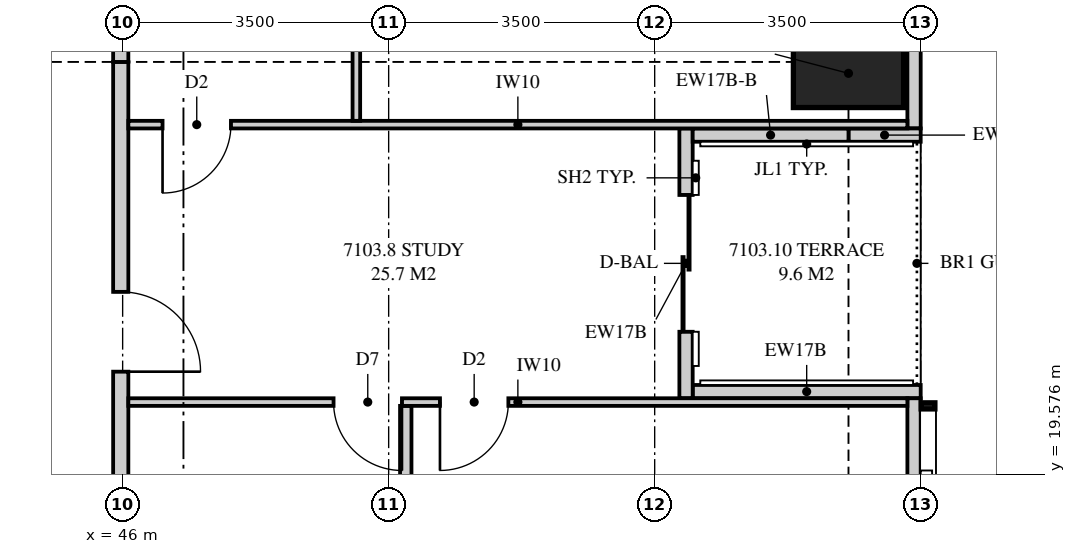
"""IFC4 building model, lengths in metres.
Left out: names, types, materials, properties, quantities, classifications, styles, units other than length and angle.
Written with IfcOpenShell. Run it as: python <this file> out.ifc"""

import sys

from ifc_helpers import new_model, si_unit, direction, frame, frame_2d, origin, origin_2d, place, context, subcontext, project, spatial, polyline, rectangle, outline, extrude, element, fill, save


model = new_model("IFC4")
c1 = context("Model", 3, precision=1e-05, world=origin(), true_north=direction((0.0, 1.0)))
c2 = subcontext(c1, "Body", "Model", "MODEL_VIEW")
j1 = project(units=[si_unit("LENGTHUNIT", "METRE"), si_unit("PLANEANGLEUNIT", "RADIAN")], contexts=[c1])
p1 = place(None, origin())
s1 = spatial("IfcSite", under=j1, at=p1, CompositionType="ELEMENT")
p2 = place(p1, origin())
s2 = spatial("IfcBuilding", under=s1, at=p2, CompositionType="ELEMENT")
p3 = place(p2, frame((0.0, 0.0, 259.95)))
s3 = spatial("IfcBuildingStorey", under=s2, at=p3, CompositionType="ELEMENT", Elevation=259.95)
p4 = place(p3, frame((55.55, 25.0, 0.0), z_axis=(0.0, 0.0, 1.0), x_axis=(1.0, 0.0, 0.0)))
e1 = element("IfcColumn", 1, at=p4, inside=s3, PredefinedType="COLUMN", context=c2, shape_type="SweptSolid", body=[
    extrude(rectangle(XDim=1.45, YDim=1.2, at=origin_2d()), origin(), (0.0, 0.0, 1.0), 3.9),
])
p5 = place(p3, frame((56.413, 3.051, 0.0), z_axis=(0.0, 0.0, 1.0), x_axis=(0.0, 1.0, 0.0)))
e2 = element("IfcWall", 2, at=p5, inside=s3, PredefinedType="SOLIDWALL", context=c2, shape_type="SweptSolid", body=[
    extrude(outline(polyline([(0.0, 0.0), (17.524, 0.0), (17.524, 2.7), (9.949, 2.7), (9.949, 3.66), (9.858, 3.66), (9.858, 2.7), (9.688, 2.7), (9.688, 3.66), (0.0, 3.66), (0.0, 0.0)])), frame((0.0, 0.087, 0.0), z_axis=(0.0, -1.0, 0.0), x_axis=(1.0, 0.0, 0.0)), (0.0, 0.0, 1.0), 0.175),
])
p6 = place(p5, frame((5.924, 0.0, 0.4)))
e3 = element("IfcOpeningElement", 3, at=p6, cuts=e2, PredefinedType="OPENING", context=c2, shape_type="SweptSolid", body=[
    extrude(rectangle(XDim=2.1, YDim=2.25, at=frame_2d((1.05, 1.125))), frame((0.0, 0.097, 0.0), z_axis=(0.0, -1.0, 0.0), x_axis=(1.0, 0.0, 0.0)), (0.0, 0.0, 1.0), 0.195),
])
p7 = place(p5, frame((10.804, 0.0, 0.4)))
e4 = element("IfcOpeningElement", 4, at=p7, cuts=e2, PredefinedType="OPENING", context=c2, shape_type="SweptSolid", body=[
    extrude(rectangle(XDim=2.1, YDim=2.25, at=frame_2d((1.05, 1.125))), frame((0.0, 0.097, 0.0), z_axis=(0.0, -1.0, 0.0), x_axis=(1.0, 0.0, 0.0)), (0.0, 0.0, 1.0), 0.195),
])
p8 = place(p5, frame((14.374, 0.0, 0.4)))
e5 = element("IfcOpeningElement", 5, at=p8, cuts=e2, PredefinedType="OPENING", context=c2, shape_type="SweptSolid", body=[
    extrude(rectangle(XDim=2.1, YDim=2.25, at=frame_2d((1.05, 1.125))), frame((0.0, 0.097, 0.0), z_axis=(0.0, -1.0, 0.0), x_axis=(1.0, 0.0, 0.0)), (0.0, 0.0, 1.0), 0.195),
])
p9 = place(p3, frame((56.413, 24.125, 0.0), z_axis=(0.0, 0.0, 1.0), x_axis=(0.0, 1.0, 0.0)))
e6 = element("IfcWall", 6, at=p9, inside=s3, PredefinedType="SOLIDWALL", context=c2, shape_type="SweptSolid", body=[
    extrude(outline(polyline([(0.0, 0.0), (6.824, 0.0), (6.824, 3.66), (1.083, 3.66), (1.083, 2.7), (1.018, 2.7), (1.018, 3.66), (0.875, 3.66), (0.875, 2.7), (0.0, 2.7), (0.0, 0.0)])), frame((0.0, 0.087, 0.0), z_axis=(0.0, -1.0, 0.0), x_axis=(1.0, 0.0, 0.0)), (0.0, 0.0, 1.0), 0.175),
])
p10 = place(p9, frame((1.729, 0.0, 0.4)))
e7 = element("IfcOpeningElement", 7, at=p10, cuts=e6, PredefinedType="OPENING", context=c2, shape_type="SweptSolid", body=[
    extrude(rectangle(XDim=2.4, YDim=2.0, at=frame_2d((1.2, 1.0))), frame((0.0, 0.097, 0.0), z_axis=(0.0, -1.0, 0.0), x_axis=(1.0, 0.0, 0.0)), (0.0, 0.0, 1.0), 0.195),
])
p11 = place(p3, frame((53.413, 20.575, 0.0), z_axis=(0.0, 0.0, 1.0), x_axis=(0.0, 1.0, 0.0)))
e8 = element("IfcWall", 8, at=p11, inside=s3, PredefinedType="SOLIDWALL", context=c2, shape_type="SweptSolid", body=[
    extrude(outline(polyline([(0.0, 0.0), (3.55, 0.0), (3.55, 3.06), (3.225, 3.06), (3.225, 3.66), (0.0, 3.66), (0.0, 0.0)])), frame((0.0, 0.087, 0.0), z_axis=(0.0, -1.0, 0.0), x_axis=(1.0, 0.0, 0.0)), (0.0, 0.0, 1.0), 0.175),
])
p12 = place(p11, frame((0.875, 0.0, 0.0)))
e9 = element("IfcOpeningElement", 9, at=p12, cuts=e8, PredefinedType="OPENING", context=c2, shape_type="SweptSolid", body=[
    extrude(rectangle(XDim=1.8, YDim=2.4, at=frame_2d((0.9, 1.2))), frame((0.0, 0.097, 0.0), z_axis=(0.0, -1.0, 0.0), x_axis=(1.0, 0.0, 0.0)), (0.0, 0.0, 1.0), 0.195),
])
p13 = place(p3, frame((56.5, 20.663, 0.0), z_axis=(0.0, 0.0, 1.0), x_axis=(-1.0, 0.0, 0.0)))
e10 = element("IfcWall", 10, at=p13, inside=s3, PredefinedType="SOLIDWALL", context=c2, shape_type="SweptSolid", body=[
    extrude(outline(polyline([(0.0, 0.0), (3.0, 0.0), (3.0, 3.66), (1.75, 3.66), (1.75, 2.7), (0.15, 2.7), (0.15, 3.66), (0.0, 3.66), (0.0, 0.0)])), frame((0.0, 0.087, 0.0), z_axis=(0.0, -1.0, 0.0), x_axis=(1.0, 0.0, 0.0)), (0.0, 0.0, 1.0), 0.175),
])
p14 = place(p3, frame((56.5, 24.038, 0.0), z_axis=(0.0, 0.0, 1.0), x_axis=(-1.0, 0.0, 0.0)))
e11 = element("IfcWall", 11, at=p14, inside=s3, PredefinedType="SOLIDWALL", context=c2, shape_type="SweptSolid", body=[
    extrude(outline(polyline([(0.0, 0.0), (0.95, 0.0), (0.95, 2.7), (0.15, 2.7), (0.15, 3.66), (0.0, 3.66), (0.0, 0.0)])), frame((0.0, 0.087, 0.0), z_axis=(0.0, -1.0, 0.0), x_axis=(1.0, 0.0, 0.0)), (0.0, 0.0, 1.0), 0.175),
])
p15 = place(p3, frame((55.55, 24.038, 0.0), z_axis=(0.0, 0.0, 1.0), x_axis=(-1.0, 0.0, 0.0)))
e12 = element("IfcWall", 12, at=p15, inside=s3, PredefinedType="SOLIDWALL", context=c2, shape_type="SweptSolid", body=[
    extrude(outline(polyline([(0.0, 0.0), (2.05, 0.0), (2.05, 3.06), (0.8, 3.06), (0.8, 2.7), (0.0, 2.7), (0.0, 0.0)])), frame((0.0, 0.087, 0.0), z_axis=(0.0, -1.0, 0.0), x_axis=(1.0, 0.0, 0.0)), (0.0, 0.0, 1.0), 0.175),
])
p16 = place(p3, frame((45.975, 13.0, 0.0), z_axis=(0.0, 0.0, 1.0), x_axis=(0.0, 1.0, 0.0)))
e13 = element("IfcWall", 13, at=p16, inside=s3, PredefinedType="PARTITIONING", context=c2, shape_type="SweptSolid", body=[
    extrude(outline(polyline([(0.0, 0.0), (12.0, 0.0), (12.0, 3.06), (10.69, 3.06), (10.69, 3.66), (7.06, 3.66), (7.06, 3.06), (4.44, 3.06), (4.44, 3.66), (1.31, 3.66), (1.31, 3.06), (0.0, 3.06), (0.0, 0.0)])), frame((0.0, 0.1, 0.0), z_axis=(0.0, -1.0, 0.0), x_axis=(1.0, 0.0, 0.0)), (0.0, 0.0, 1.0), 0.2),
])
p17 = place(p16, frame((7.925, 0.0, 0.0)))
e14 = element("IfcOpeningElement", 14, at=p17, cuts=e13, PredefinedType="OPENING", context=c2, shape_type="SweptSolid", body=[
    extrude(rectangle(XDim=1.05, YDim=2.2, at=frame_2d((0.525, 1.1))), frame((0.0, 0.11, 0.0), z_axis=(0.0, -1.0, 0.0), x_axis=(1.0, 0.0, 0.0)), (0.0, 0.0, 1.0), 0.22),
])
p18 = place(p3, frame((45.975, 25.0, 0.0), z_axis=(0.0, 0.0, 1.0), x_axis=(0.0, 1.0, 0.0)))
e15 = element("IfcWall", 15, at=p18, inside=s3, PredefinedType="PARTITIONING", context=c2, shape_type="SweptSolid", body=[
    extrude(rectangle(XDim=3.975, YDim=0.2, at=frame_2d((1.988, 0.0))), origin(), (0.0, 0.0, 1.0), 3.06),
])
p19 = place(p3, frame((56.325, 20.525, 0.0), z_axis=(0.0, 0.0, 1.0), x_axis=(-1.0, 0.0, 0.0)))
e16 = element("IfcWall", 16, at=p19, inside=s3, PredefinedType="PARTITIONING", context=c2, shape_type="SweptSolid", body=[
    extrude(outline(polyline([(0.0, 0.0), (10.25, 0.0), (10.25, 3.66), (1.635, 3.66), (1.635, 2.7), (0.0, 2.7), (0.0, 3.66), (0.0, 0.0)])), frame((0.0, 0.05, 0.0), z_axis=(0.0, -1.0, 0.0), x_axis=(1.0, 0.0, 0.0)), (0.0, 0.0, 1.0), 0.1),
])
p20 = place(p19, frame((5.25, 0.0, 0.0)))
e17 = element("IfcOpeningElement", 17, at=p20, cuts=e16, PredefinedType="OPENING", context=c2, shape_type="SweptSolid", body=[
    extrude(rectangle(XDim=0.9, YDim=2.1, at=frame_2d((0.45, 1.05))), frame((0.0, 0.06, 0.0), z_axis=(0.0, -1.0, 0.0), x_axis=(1.0, 0.0, 0.0)), (0.0, 0.0, 1.0), 0.12),
])
p21 = place(p19, frame((6.65, 0.0, 0.0)))
e18 = element("IfcOpeningElement", 18, at=p21, cuts=e16, PredefinedType="OPENING", context=c2, shape_type="SweptSolid", body=[
    extrude(rectangle(XDim=0.9, YDim=2.1, at=frame_2d((0.45, 1.05))), frame((0.0, 0.06, 0.0), z_axis=(0.0, -1.0, 0.0), x_axis=(1.0, 0.0, 0.0)), (0.0, 0.0, 1.0), 0.12),
])
p22 = place(p3, frame((49.725, 16.475, 0.0), z_axis=(0.0, 0.0, 1.0), x_axis=(0.0, 1.0, 0.0)))
e19 = element("IfcWall", 19, at=p22, inside=s3, PredefinedType="PLUMBINGWALL", context=c2, shape_type="SweptSolid", body=[
    extrude(outline(polyline([(0.0, 0.0), (4.0, 0.0), (4.0, 3.66), (3.56, 3.66), (3.56, 3.06), (0.99, 3.06), (0.99, 3.66), (0.0, 3.66), (0.0, 0.0)])), frame((0.0, 0.075, 0.0), z_axis=(0.0, -1.0, 0.0), x_axis=(1.0, 0.0, 0.0)), (0.0, 0.0, 1.0), 0.15),
])
p23 = place(p3, frame((56.325, 24.175, 0.0), z_axis=(0.0, 0.0, 1.0), x_axis=(-1.0, 0.0, 0.0)))
e20 = element("IfcWall", 20, at=p23, inside=s3, PredefinedType="PARTITIONING", context=c2, shape_type="SweptSolid", body=[
    extrude(outline(polyline([(0.0, 0.0), (10.25, 0.0), (10.25, 3.66), (10.25, 3.06), (1.635, 3.06), (1.635, 2.7), (0.0, 2.7), (0.0, 3.66), (0.0, 0.0)])), frame((0.0, 0.05, 0.0), z_axis=(0.0, -1.0, 0.0), x_axis=(1.0, 0.0, 0.0)), (0.0, 0.0, 1.0), 0.1),
])
p24 = place(p23, frame((8.9, 0.0, 0.0)))
e21 = element("IfcOpeningElement", 21, at=p24, cuts=e20, PredefinedType="OPENING", context=c2, shape_type="SweptSolid", body=[
    extrude(rectangle(XDim=0.9, YDim=2.1, at=frame_2d((0.45, 1.05))), frame((0.0, 0.06, 0.0), z_axis=(0.0, -1.0, 0.0), x_axis=(1.0, 0.0, 0.0)), (0.0, 0.0, 1.0), 0.12),
])
p25 = place(p3, frame((49.075, 24.225, 0.0), z_axis=(0.0, 0.0, 1.0), x_axis=(0.0, 1.0, 0.0)))
e22 = element("IfcWall", 22, at=p25, inside=s3, PredefinedType="PARTITIONING", context=c2, shape_type="SweptSolid", body=[
    extrude(outline(polyline([(0.0, 0.0), (2.9, 0.0), (2.9, 3.66), (2.035, 3.66), (2.035, 3.06), (0.0, 3.06), (0.0, 3.66), (0.0, 0.0)])), frame((0.0, 0.05, 0.0), z_axis=(0.0, -1.0, 0.0), x_axis=(1.0, 0.0, 0.0)), (0.0, 0.0, 1.0), 0.1),
])
p26 = place(p25, frame((1.0, 0.0, 0.0)))
e23 = element("IfcOpeningElement", 23, at=p26, cuts=e22, PredefinedType="OPENING", context=c2, shape_type="SweptSolid", body=[
    extrude(rectangle(XDim=0.9, YDim=2.1, at=frame_2d((0.45, 1.05))), frame((0.0, 0.06, 0.0), z_axis=(0.0, -1.0, 0.0), x_axis=(1.0, 0.0, 0.0)), (0.0, 0.0, 1.0), 0.12),
])
p27 = place(p12, origin())
e24 = element("IfcDoor", 24, at=p27, inside=s3, OperationType="SLIDING_TO_LEFT", PredefinedType="DOOR", context=c2, shape_type="SweptSolid", body=[
    extrude(rectangle(XDim=1.8, YDim=2.4, at=frame_2d((0.9, 1.2))), frame((0.0, 0.025, 0.0), z_axis=(0.0, -1.0, 0.0), x_axis=(1.0, 0.0, 0.0)), (0.0, 0.0, 1.0), 0.05),
])
fill(e9, e24)
p28 = place(p17, frame((1.05, 0.0, 0.0), z_axis=(0.0, 0.0, 1.0), x_axis=(-1.0, 0.0, 0.0)))
e25 = element("IfcDoor", 25, at=p28, inside=s3, OperationType="SINGLE_SWING_RIGHT", PredefinedType="DOOR", context=c2, shape_type="SweptSolid", body=[
    extrude(rectangle(XDim=1.05, YDim=2.2, at=frame_2d((0.525, 1.1))), frame((0.0, 0.025, 0.0), z_axis=(0.0, -1.0, 0.0), x_axis=(1.0, 0.0, 0.0)), (0.0, 0.0, 1.0), 0.05),
])
fill(e14, e25)
p29 = place(p20, origin())
e26 = element("IfcDoor", 26, at=p29, inside=s3, OperationType="SINGLE_SWING_RIGHT", PredefinedType="DOOR", context=c2, shape_type="SweptSolid", body=[
    extrude(rectangle(XDim=0.9, YDim=2.1, at=frame_2d((0.45, 1.05))), frame((0.0, 0.025, 0.0), z_axis=(0.0, -1.0, 0.0), x_axis=(1.0, 0.0, 0.0)), (0.0, 0.0, 1.0), 0.05),
])
fill(e17, e26)
p30 = place(p21, origin())
e27 = element("IfcDoor", 27, at=p30, inside=s3, OperationType="SINGLE_SWING_LEFT", PredefinedType="DOOR", context=c2, shape_type="SweptSolid", body=[
    extrude(rectangle(XDim=0.9, YDim=2.1, at=frame_2d((0.45, 1.05))), frame((0.0, 0.025, 0.0), z_axis=(0.0, -1.0, 0.0), x_axis=(1.0, 0.0, 0.0)), (0.0, 0.0, 1.0), 0.05),
])
fill(e18, e27)
p31 = place(p24, origin())
e28 = element("IfcDoor", 28, at=p31, inside=s3, OperationType="SINGLE_SWING_RIGHT", PredefinedType="DOOR", context=c2, shape_type="SweptSolid", body=[
    extrude(rectangle(XDim=0.9, YDim=2.1, at=frame_2d((0.45, 1.05))), frame((0.0, 0.025, 0.0), z_axis=(0.0, -1.0, 0.0), x_axis=(1.0, 0.0, 0.0)), (0.0, 0.0, 1.0), 0.05),
])
fill(e21, e28)
save(model, sys.argv[1])
